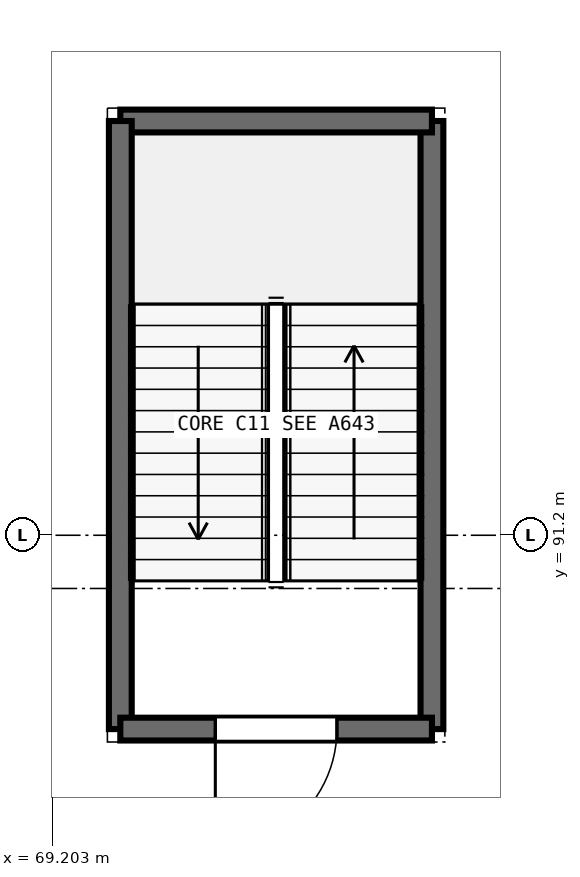
"""IFC4 building model, lengths in metres.
Left out: names, types, materials, properties, quantities, classifications, styles, units other than length and angle.
Written with IfcOpenShell. Run it as: python <this file> out.ifc"""

import sys

from ifc_helpers import new_model, si_unit, direction, frame, frame_2d, origin, place, context, subcontext, project, spatial, rectangle, extrude, element, fill, save


model = new_model("IFC4")
c1 = context("Model", 3, precision=1e-05, world=origin(), true_north=direction((0.0, 1.0)))
c2 = subcontext(c1, "Body", "Model", "MODEL_VIEW")
j1 = project(units=[si_unit("LENGTHUNIT", "METRE"), si_unit("PLANEANGLEUNIT", "RADIAN")], contexts=[c1])
p1 = place(None, origin())
s1 = spatial("IfcSite", under=j1, at=p1, CompositionType="ELEMENT")
p2 = place(p1, origin())
s2 = spatial("IfcBuilding", under=s1, at=p2, CompositionType="ELEMENT")
p3 = place(p2, frame((0.0, 0.0, -4.8)))
s3 = spatial("IfcBuildingStorey", under=s2, at=p3, CompositionType="ELEMENT", Elevation=-4.8)
p4 = place(p3, frame((74.2, 88.65, 0.0), z_axis=(0.0, 0.0, 1.0), x_axis=(0.0, 1.0, 0.0)))
e1 = element("IfcWall", 1, at=p4, inside=s3, PredefinedType="SHEAR", context=c2, shape_type="SweptSolid", body=[
    extrude(rectangle(XDim=8.0, YDim=0.3, at=frame_2d((4.0, 0.0))), origin(), (0.0, 0.0, 1.0), 4.8),
])
p5 = place(p3, frame((74.2, 96.65, 0.0), z_axis=(0.0, 0.0, 1.0), x_axis=(-1.0, 0.0, 0.0)))
e2 = element("IfcWall", 2, at=p5, inside=s3, PredefinedType="SHEAR", context=c2, shape_type="SweptSolid", body=[
    extrude(rectangle(XDim=4.1, YDim=0.3, at=frame_2d((2.05, 0.0))), origin(), (0.0, 0.0, 1.0), 4.8),
])
p6 = place(p3, frame((70.1, 96.65, 0.0), z_axis=(0.0, 0.0, 1.0), x_axis=(0.0, -1.0, 0.0)))
e3 = element("IfcWall", 3, at=p6, inside=s3, PredefinedType="SHEAR", context=c2, shape_type="SweptSolid", body=[
    extrude(rectangle(XDim=8.0, YDim=0.3, at=frame_2d((4.0, 0.0))), origin(), (0.0, 0.0, 1.0), 4.8),
])
p7 = place(p3, frame((70.1, 88.65, 0.0), z_axis=(0.0, 0.0, 1.0), x_axis=(1.0, 0.0, 0.0)))
e4 = element("IfcWall", 4, at=p7, inside=s3, PredefinedType="SHEAR", context=c2, shape_type="SweptSolid", body=[
    extrude(rectangle(XDim=4.1, YDim=0.3, at=frame_2d((2.05, 0.0))), origin(), (0.0, 0.0, 1.0), 4.8),
])
p8 = place(p7, frame((1.25, 0.0, 0.0)))
e5 = element("IfcOpeningElement", 5, at=p8, cuts=e4, PredefinedType="OPENING", context=c2, shape_type="SweptSolid", body=[
    extrude(rectangle(XDim=1.6, YDim=2.25, at=frame_2d((0.8, 1.125))), frame((0.0, 0.16, 0.0), z_axis=(0.0, -1.0, 0.0), x_axis=(1.0, 0.0, 0.0)), (0.0, 0.0, 1.0), 0.32),
])
p9 = place(p8, frame((1.6, 0.0, 0.0), z_axis=(0.0, 0.0, 1.0), x_axis=(-1.0, 0.0, 0.0)))
e6 = element("IfcDoor", 6, at=p9, inside=s3, OperationType="SINGLE_SWING_RIGHT", PredefinedType="DOOR", context=c2, shape_type="SweptSolid", body=[
    extrude(rectangle(XDim=1.6, YDim=2.25, at=frame_2d((0.8, 1.125))), frame((0.0, 0.025, 0.0), z_axis=(0.0, -1.0, 0.0), x_axis=(1.0, 0.0, 0.0)), (0.0, 0.0, 1.0), 0.05),
])
fill(e5, e6)
save(model, sys.argv[1])
